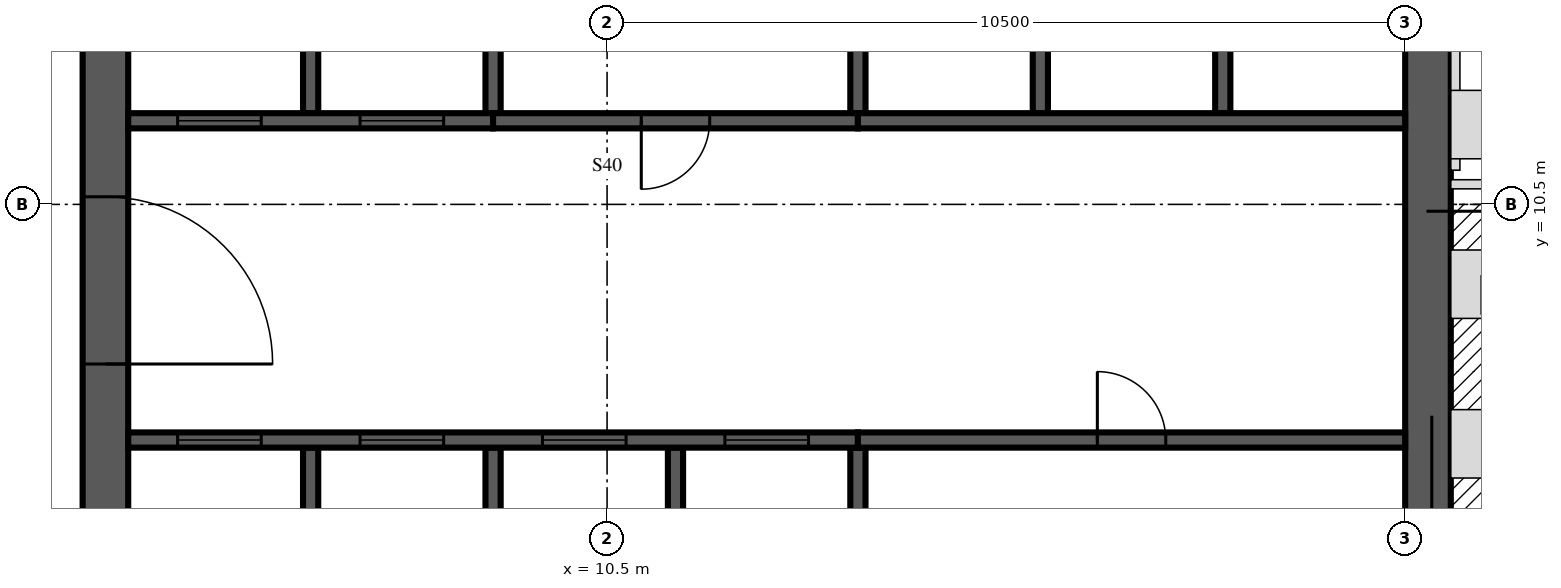
"""IFC4 building model, lengths in metres.
Left out: names, types, materials, properties, quantities, classifications, styles, units other than length and angle.
Written with IfcOpenShell. Run it as: python <this file> out.ifc"""

import sys

from ifc_helpers import new_model, si_unit, direction, frame, frame_2d, origin, place, context, subcontext, project, spatial, rectangle, extrude, source, transform, mapped, element, fill, save


model = new_model("IFC4")
c1 = context("Model", 3, precision=1e-05, world=origin(), true_north=direction((0.0, 1.0)))
c2 = subcontext(c1, "Body", "Model", "MODEL_VIEW")
j1 = project(units=[si_unit("LENGTHUNIT", "METRE"), si_unit("PLANEANGLEUNIT", "RADIAN")], contexts=[c1])
p1 = place(None, origin())
s1 = spatial("IfcSite", under=j1, at=p1, CompositionType="ELEMENT")
p2 = place(p1, origin())
s2 = spatial("IfcBuilding", under=s1, at=p2, CompositionType="ELEMENT")
p3 = place(p2, frame((0.0, 0.0, 351.0)))
s3 = spatial("IfcBuildingStorey", under=s2, at=p3, CompositionType="ELEMENT", Elevation=351.0)
m1 = source(origin(), c2, "Body", "SweptSolid", [
    extrude(rectangle(XDim=17.4, YDim=0.6, at=frame_2d((8.7, 0.0))), origin(), (0.0, 0.0, 1.0), 3.5),
])
p4 = place(p3, frame((3.9, 4.2, 0.0), z_axis=(0.0, 0.0, 1.0), x_axis=(0.0, 1.0, 0.0)))
e1 = element("IfcWall", 1, at=p4, inside=s3, PredefinedType="SHEAR", context=c2, shape_type="MappedRepresentation", body=[
    mapped(m1, transform((0.0, 0.0, 0.0), scale=1.0)),
])
m2 = source(origin(), c2, "Body", "SweptSolid", [
    extrude(rectangle(XDim=2.2, YDim=2.1, at=frame_2d((1.1, 1.05))), frame((0.0, 0.31, 0.0), z_axis=(0.0, -1.0, 0.0), x_axis=(1.0, 0.0, 0.0)), (0.0, 0.0, 1.0), 0.62),
])
p5 = place(p4, frame((4.2, 0.0, 0.0)))
e2 = element("IfcOpeningElement", 2, at=p5, cuts=e1, PredefinedType="OPENING", context=c2, shape_type="MappedRepresentation", body=[
    mapped(m2, transform((0.0, 0.0, 0.0), scale=1.0)),
])
m3 = source(origin(), c2, "Body", "SweptSolid", [
    extrude(rectangle(XDim=16.8, YDim=0.6, at=frame_2d((8.4, 0.0))), origin(), (0.0, 0.0, 1.0), 3.5),
])
p6 = place(p3, frame((21.3, 4.2, 0.0), z_axis=(0.0, 0.0, 1.0), x_axis=(0.0, 1.0, 0.0)))
e3 = element("IfcWall", 3, at=p6, inside=s3, PredefinedType="SHEAR", context=c2, shape_type="MappedRepresentation", body=[
    mapped(m3, transform((0.0, 0.0, 0.0), scale=1.0)),
])
m4 = source(origin(), c2, "Body", "SweptSolid", [
    extrude(rectangle(XDim=1.2, YDim=2.4, at=frame_2d((0.6, 1.2))), frame((0.0, 0.31, 0.0), z_axis=(0.0, -1.0, 0.0), x_axis=(1.0, 0.0, 0.0)), (0.0, 0.0, 1.0), 0.62),
])
p7 = place(p6, frame((12.0, 0.0, 0.6)))
e4 = element("IfcOpeningElement", 4, at=p7, cuts=e3, PredefinedType="OPENING", context=c2, shape_type="MappedRepresentation", body=[
    mapped(m4, transform((0.0, 0.0, 0.0), scale=1.0)),
])
m5 = source(origin(), c2, "Body", "SweptSolid", [
    extrude(rectangle(XDim=3.1, YDim=0.2, at=frame_2d((1.55, 0.0))), origin(), (0.0, 0.0, 1.0), 3.5),
])
for number, where, z_axis, x_axis in (
    (5, (6.6, 4.2, 0.0), (0.0, 0.0, 1.0), (0.0, 1.0, 0.0)),
    (6, (9.0, 4.2, 0.0), (0.0, 0.0, 1.0), (0.0, 1.0, 0.0)),
    (7, (11.4, 4.2, 0.0), (0.0, 0.0, 1.0), (0.0, 1.0, 0.0)),
):
    element("IfcWall", number, at=place(p3, frame(where, z_axis=z_axis, x_axis=x_axis)), inside=s3, PredefinedType="SOLIDWALL", context=c2, shape_type="MappedRepresentation", body=[
        mapped(m5, transform((0.0, 0.0, 0.0), scale=1.0)),
    ])
m6 = source(origin(), c2, "Body", "SweptSolid", [
    extrude(rectangle(XDim=3.1, YDim=0.2, at=frame_2d((1.55, 0.0))), origin(), (0.0, 0.0, 1.0), 3.1),
])
p8 = place(p3, frame((13.8, 4.2, 0.0), z_axis=(0.0, 0.0, 1.0), x_axis=(0.0, 1.0, 0.0)))
e8 = element("IfcWall", 8, at=p8, inside=s3, PredefinedType="SOLIDWALL", context=c2, shape_type="MappedRepresentation", body=[
    mapped(m6, transform((0.0, 0.0, 0.0), scale=1.0)),
])
m7 = source(origin(), c2, "Body", "SweptSolid", [
    extrude(rectangle(XDim=3.0, YDim=0.2, at=frame_2d((1.5, 0.0))), origin(), (0.0, 0.0, 1.0), 3.5),
])
p9 = place(p3, frame((6.6, 11.7, 0.0), z_axis=(0.0, 0.0, 1.0), x_axis=(0.0, 1.0, 0.0)))
e9 = element("IfcWall", 9, at=p9, inside=s3, PredefinedType="SOLIDWALL", context=c2, shape_type="MappedRepresentation", body=[
    mapped(m7, transform((0.0, 0.0, 0.0), scale=1.0)),
])
m8 = source(origin(), c2, "Body", "SweptSolid", [
    extrude(rectangle(XDim=3.0, YDim=0.2, at=frame_2d((1.5, 0.0))), origin(), (0.0, 0.0, 1.0), 3.1),
])
for number, where, z_axis, x_axis in (
    (10, (9.0, 11.7, 0.0), (0.0, 0.0, 1.0), (0.0, 1.0, 0.0)),
    (11, (13.8, 11.7, 0.0), (0.0, 0.0, 1.0), (0.0, 1.0, 0.0)),
):
    element("IfcWall", number, at=place(p3, frame(where, z_axis=z_axis, x_axis=x_axis)), inside=s3, PredefinedType="SOLIDWALL", context=c2, shape_type="MappedRepresentation", body=[
        mapped(m8, transform((0.0, 0.0, 0.0), scale=1.0)),
    ])
for number, where, z_axis, x_axis in (
    (12, (16.2, 11.7, 0.0), (0.0, 0.0, 1.0), (0.0, 1.0, 0.0)),
    (13, (18.6, 11.7, 0.0), (0.0, 0.0, 1.0), (0.0, 1.0, 0.0)),
):
    element("IfcWall", number, at=place(p3, frame(where, z_axis=z_axis, x_axis=x_axis)), inside=s3, PredefinedType="SOLIDWALL", context=c2, shape_type="MappedRepresentation", body=[
        mapped(m7, transform((0.0, 0.0, 0.0), scale=1.0)),
    ])
m9 = source(origin(), c2, "Body", "SweptSolid", [
    extrude(rectangle(XDim=9.6, YDim=0.2, at=frame_2d((4.8, 0.0))), origin(), (0.0, 0.0, 1.0), 3.5),
])
p10 = place(p3, frame((4.2, 7.4, 0.0), z_axis=(0.0, 0.0, 1.0), x_axis=(1.0, 0.0, 0.0)))
e14 = element("IfcWall", 14, at=p10, inside=s3, PredefinedType="SOLIDWALL", context=c2, shape_type="MappedRepresentation", body=[
    mapped(m9, transform((0.0, 0.0, 0.0), scale=1.0)),
])
m10 = source(origin(), c2, "Body", "SweptSolid", [
    extrude(rectangle(XDim=1.1, YDim=2.1, at=frame_2d((0.55, 1.05))), frame((0.0, 0.11, 0.0), z_axis=(0.0, -1.0, 0.0), x_axis=(1.0, 0.0, 0.0)), (0.0, 0.0, 1.0), 0.22),
])
p11 = place(p10, frame((0.65, 0.0, 0.0)))
e15 = element("IfcOpeningElement", 15, at=p11, cuts=e14, PredefinedType="OPENING", context=c2, shape_type="MappedRepresentation", body=[
    mapped(m10, transform((0.0, 0.0, 0.0), scale=1.0)),
])
p12 = place(p10, frame((3.05, 0.0, 0.0)))
e16 = element("IfcOpeningElement", 16, at=p12, cuts=e14, PredefinedType="OPENING", context=c2, shape_type="MappedRepresentation", body=[
    mapped(m10, transform((0.0, 0.0, 0.0), scale=1.0)),
])
p13 = place(p10, frame((5.45, 0.0, 0.0)))
e17 = element("IfcOpeningElement", 17, at=p13, cuts=e14, PredefinedType="OPENING", context=c2, shape_type="MappedRepresentation", body=[
    mapped(m10, transform((0.0, 0.0, 0.0), scale=1.0)),
])
p14 = place(p10, frame((7.85, 0.0, 0.0)))
e18 = element("IfcOpeningElement", 18, at=p14, cuts=e14, PredefinedType="OPENING", context=c2, shape_type="MappedRepresentation", body=[
    mapped(m10, transform((0.0, 0.0, 0.0), scale=1.0)),
])
m11 = source(origin(), c2, "Body", "SweptSolid", [
    extrude(rectangle(XDim=7.2, YDim=0.2, at=frame_2d((3.6, 0.0))), origin(), (0.0, 0.0, 1.0), 3.1),
])
p15 = place(p3, frame((13.8, 7.4, 0.0), z_axis=(0.0, 0.0, 1.0), x_axis=(1.0, 0.0, 0.0)))
e19 = element("IfcWall", 19, at=p15, inside=s3, PredefinedType="SOLIDWALL", context=c2, shape_type="MappedRepresentation", body=[
    mapped(m11, transform((0.0, 0.0, 0.0), scale=1.0)),
])
m12 = source(origin(), c2, "Body", "SweptSolid", [
    extrude(rectangle(XDim=0.9, YDim=2.1, at=frame_2d((0.45, 1.05))), frame((0.0, 0.11, 0.0), z_axis=(0.0, -1.0, 0.0), x_axis=(1.0, 0.0, 0.0)), (0.0, 0.0, 1.0), 0.22),
])
p16 = place(p15, frame((3.15, 0.0, 0.0)))
e20 = element("IfcOpeningElement", 20, at=p16, cuts=e19, PredefinedType="OPENING", context=c2, shape_type="MappedRepresentation", body=[
    mapped(m12, transform((0.0, 0.0, 0.0), scale=1.0)),
])
m13 = source(origin(), c2, "Body", "SweptSolid", [
    extrude(rectangle(XDim=4.8, YDim=0.2, at=frame_2d((2.4, 0.0))), origin(), (0.0, 0.0, 1.0), 3.5),
])
p17 = place(p3, frame((4.2, 11.6, 0.0), z_axis=(0.0, 0.0, 1.0), x_axis=(1.0, 0.0, 0.0)))
e21 = element("IfcWall", 21, at=p17, inside=s3, PredefinedType="SOLIDWALL", context=c2, shape_type="MappedRepresentation", body=[
    mapped(m13, transform((0.0, 0.0, 0.0), scale=1.0)),
])
p18 = place(p17, frame((0.65, 0.0, 0.0)))
e22 = element("IfcOpeningElement", 22, at=p18, cuts=e21, PredefinedType="OPENING", context=c2, shape_type="MappedRepresentation", body=[
    mapped(m10, transform((0.0, 0.0, 0.0), scale=1.0)),
])
p19 = place(p17, frame((3.05, 0.0, 0.0)))
e23 = element("IfcOpeningElement", 23, at=p19, cuts=e21, PredefinedType="OPENING", context=c2, shape_type="MappedRepresentation", body=[
    mapped(m10, transform((0.0, 0.0, 0.0), scale=1.0)),
])
m14 = source(origin(), c2, "Body", "SweptSolid", [
    extrude(rectangle(XDim=4.8, YDim=0.2, at=frame_2d((2.4, 0.0))), origin(), (0.0, 0.0, 1.0), 3.1),
])
p20 = place(p3, frame((9.0, 11.6, 0.0), z_axis=(0.0, 0.0, 1.0), x_axis=(1.0, 0.0, 0.0)))
e24 = element("IfcWall", 24, at=p20, inside=s3, PredefinedType="SOLIDWALL", context=c2, shape_type="MappedRepresentation", body=[
    mapped(m14, transform((0.0, 0.0, 0.0), scale=1.0)),
])
p21 = place(p20, frame((1.95, 0.0, 0.0)))
e25 = element("IfcOpeningElement", 25, at=p21, cuts=e24, PredefinedType="OPENING", context=c2, shape_type="MappedRepresentation", body=[
    mapped(m12, transform((0.0, 0.0, 0.0), scale=1.0)),
])
m15 = source(origin(), c2, "Body", "SweptSolid", [
    extrude(rectangle(XDim=7.2, YDim=0.2, at=frame_2d((3.6, 0.0))), origin(), (0.0, 0.0, 1.0), 3.5),
])
p22 = place(p3, frame((13.8, 11.6, 0.0), z_axis=(0.0, 0.0, 1.0), x_axis=(1.0, 0.0, 0.0)))
e26 = element("IfcWall", 26, at=p22, inside=s3, PredefinedType="SOLIDWALL", context=c2, shape_type="MappedRepresentation", body=[
    mapped(m15, transform((0.0, 0.0, 0.0), scale=1.0)),
])
m16 = source(origin(), c2, "Body", "SweptSolid", [
    extrude(rectangle(XDim=1.1, YDim=2.1, at=frame_2d((0.55, 1.05))), frame((0.0, 0.025, 0.0), z_axis=(0.0, -1.0, 0.0), x_axis=(1.0, 0.0, 0.0)), (0.0, 0.0, 1.0), 0.05),
])
p23 = place(p11, origin())
e27 = element("IfcDoor", 27, at=p23, inside=s3, OperationType="SLIDING_TO_LEFT", PredefinedType="DOOR", context=c2, shape_type="MappedRepresentation", body=[
    mapped(m16, transform((0.0, 0.0, 0.0), scale=1.0)),
])
fill(e15, e27)
p24 = place(p12, origin())
e28 = element("IfcDoor", 28, at=p24, inside=s3, OperationType="SLIDING_TO_LEFT", PredefinedType="DOOR", context=c2, shape_type="MappedRepresentation", body=[
    mapped(m16, transform((0.0, 0.0, 0.0), scale=1.0)),
])
fill(e16, e28)
p25 = place(p13, origin())
e29 = element("IfcDoor", 29, at=p25, inside=s3, OperationType="SLIDING_TO_LEFT", PredefinedType="DOOR", context=c2, shape_type="MappedRepresentation", body=[
    mapped(m16, transform((0.0, 0.0, 0.0), scale=1.0)),
])
fill(e17, e29)
p26 = place(p14, origin())
e30 = element("IfcDoor", 30, at=p26, inside=s3, OperationType="SLIDING_TO_LEFT", PredefinedType="DOOR", context=c2, shape_type="MappedRepresentation", body=[
    mapped(m16, transform((0.0, 0.0, 0.0), scale=1.0)),
])
fill(e18, e30)
m17 = source(origin(), c2, "Body", "SweptSolid", [
    extrude(rectangle(XDim=0.9, YDim=2.1, at=frame_2d((0.45, 1.05))), frame((0.0, 0.025, 0.0), z_axis=(0.0, -1.0, 0.0), x_axis=(1.0, 0.0, 0.0)), (0.0, 0.0, 1.0), 0.05),
])
p27 = place(p16, origin())
e31 = element("IfcDoor", 31, at=p27, inside=s3, OperationType="SINGLE_SWING_LEFT", PredefinedType="DOOR", context=c2, shape_type="MappedRepresentation", body=[
    mapped(m17, transform((0.0, 0.0, 0.0), scale=1.0)),
])
fill(e20, e31)
p28 = place(p18, origin())
e32 = element("IfcDoor", 32, at=p28, inside=s3, OperationType="SLIDING_TO_LEFT", PredefinedType="DOOR", context=c2, shape_type="MappedRepresentation", body=[
    mapped(m16, transform((0.0, 0.0, 0.0), scale=1.0)),
])
fill(e22, e32)
p29 = place(p19, origin())
e33 = element("IfcDoor", 33, at=p29, inside=s3, OperationType="SLIDING_TO_LEFT", PredefinedType="DOOR", context=c2, shape_type="MappedRepresentation", body=[
    mapped(m16, transform((0.0, 0.0, 0.0), scale=1.0)),
])
fill(e23, e33)
p30 = place(p21, origin())
e34 = element("IfcDoor", 34, at=p30, inside=s3, OperationType="SINGLE_SWING_RIGHT", PredefinedType="DOOR", context=c2, shape_type="MappedRepresentation", body=[
    mapped(m17, transform((0.0, 0.0, 0.0), scale=1.0)),
])
fill(e25, e34)
m18 = source(origin(), c2, "Body", "SweptSolid", [
    extrude(rectangle(XDim=2.2, YDim=2.1, at=frame_2d((1.1, 1.05))), frame((0.0, 0.025, 0.0), z_axis=(0.0, -1.0, 0.0), x_axis=(1.0, 0.0, 0.0)), (0.0, 0.0, 1.0), 0.05),
])
p31 = place(p5, origin())
e35 = element("IfcDoor", 35, at=p31, inside=s3, OperationType="DOUBLE_DOOR_SINGLE_SWING", PredefinedType="DOOR", context=c2, shape_type="MappedRepresentation", body=[
    mapped(m18, transform((0.0, 0.0, 0.0), scale=1.0)),
])
fill(e2, e35)
save(model, sys.argv[1])
